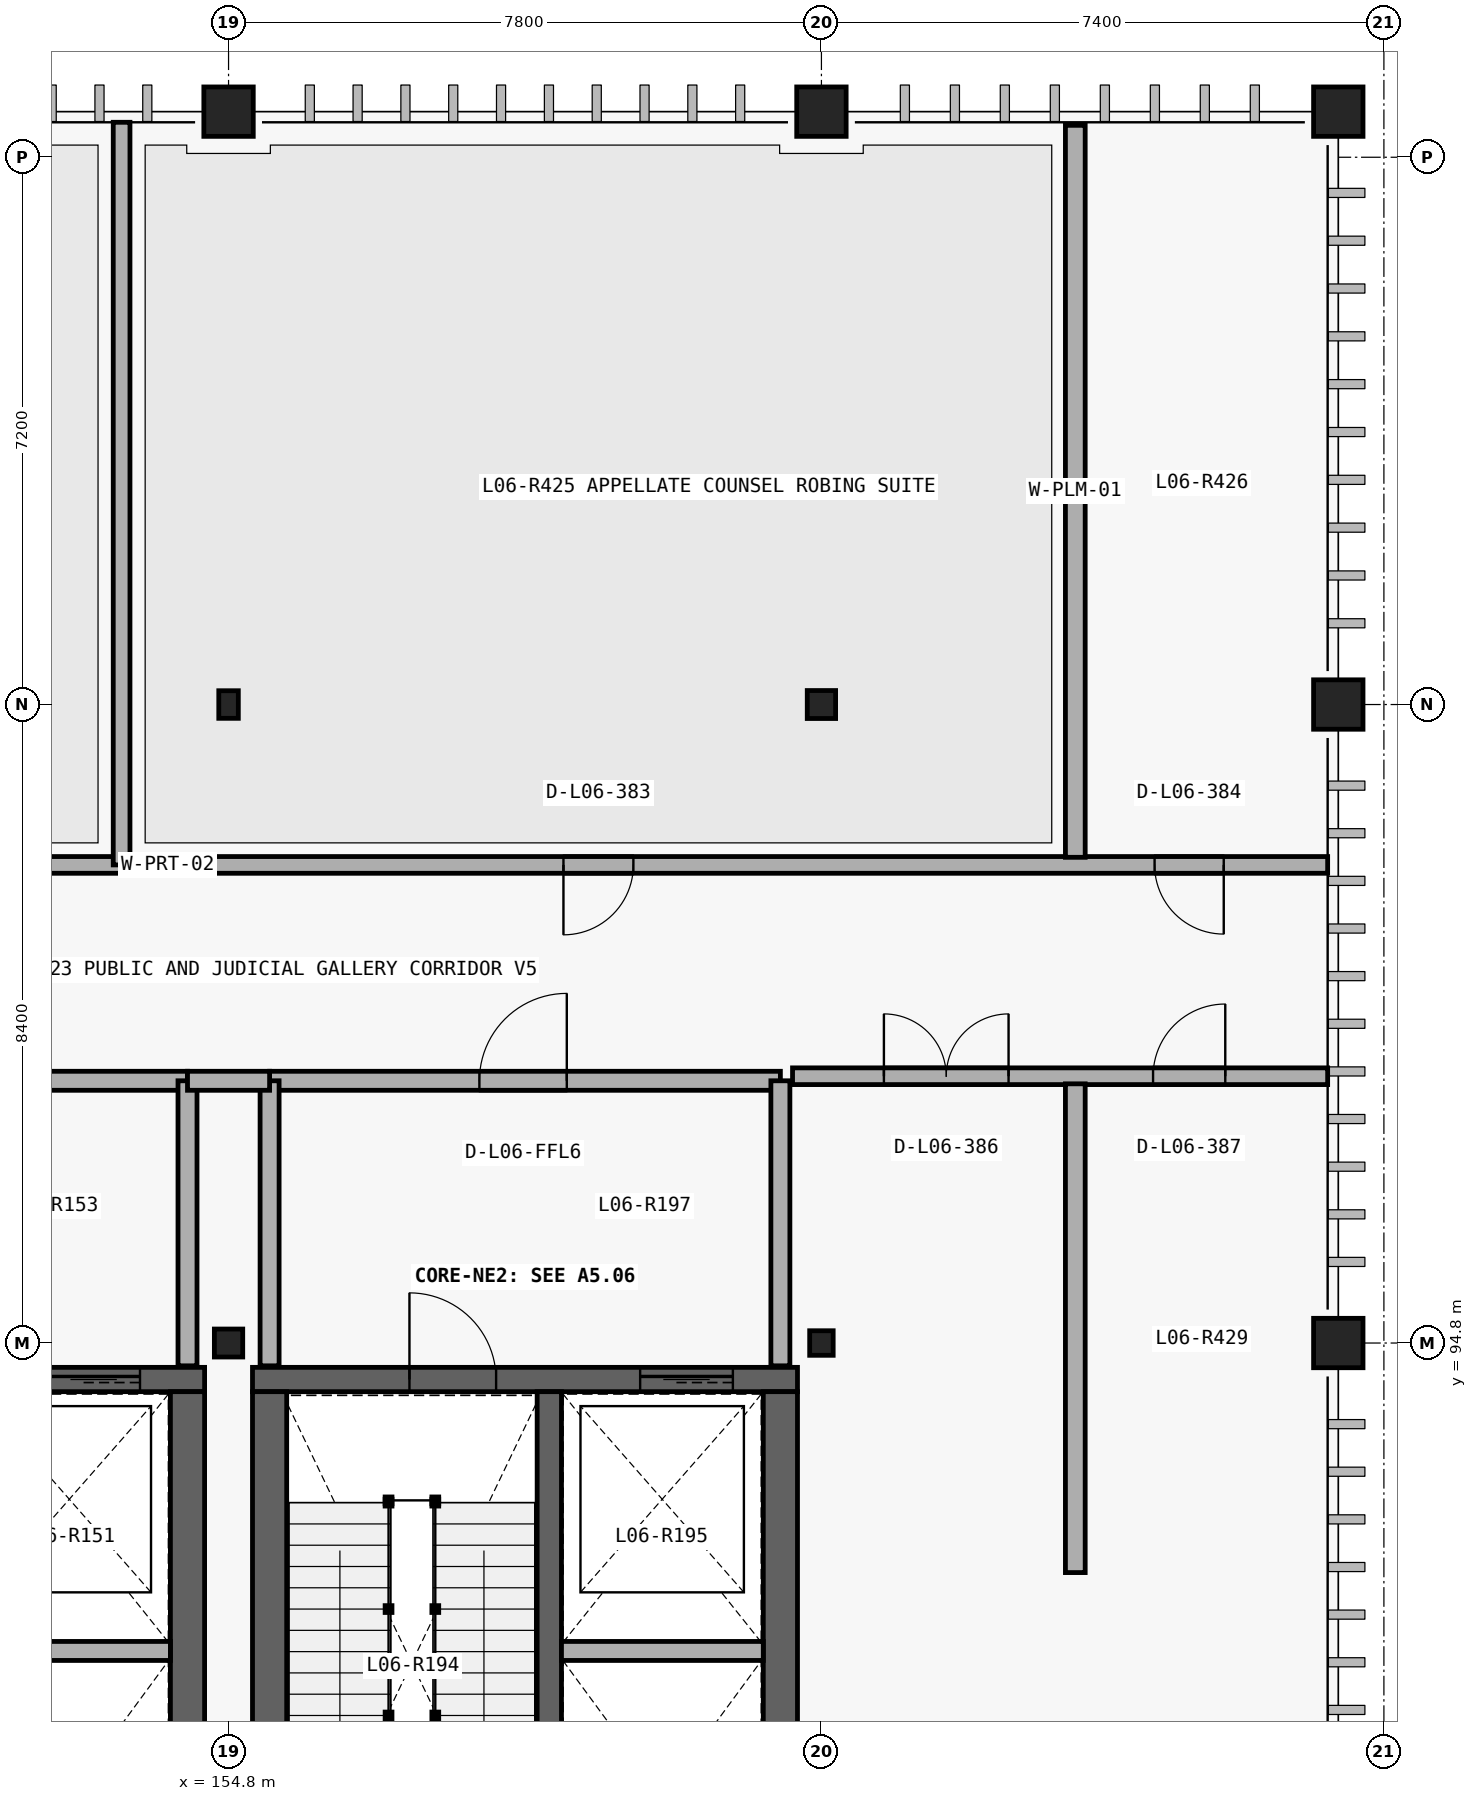
"""IFC4 building model, lengths in metres.
Left out: names, types, materials, properties, quantities, classifications, styles, units other than length and angle.
Written with IfcOpenShell. Run it as: python <this file> out.ifc"""

import sys

from ifc_helpers import new_model, si_unit, direction, frame, frame_2d, origin_with_axes, origin_2d_with_axis, place, context, subcontext, project, spatial, rectangle, circle, i_section, extrude, element, fill, save


model = new_model("IFC4")
c1 = context("Model", 3, precision=1e-05, world=origin_with_axes(), true_north=direction((0.0, 1.0)))
c2 = subcontext(c1, "Body", "Model", "MODEL_VIEW")
j1 = project(units=[si_unit("LENGTHUNIT", "METRE"), si_unit("PLANEANGLEUNIT", "RADIAN")], contexts=[c1])
p1 = place(None, origin_with_axes())
s1 = spatial("IfcSite", under=j1, at=p1, CompositionType="ELEMENT")
p2 = place(p1, origin_with_axes())
s2 = spatial("IfcBuilding", under=s1, at=p2, CompositionType="ELEMENT")
p3 = place(p2, frame((0.0, 0.0, 29.7), z_axis=(0.0, 0.0, 1.0), x_axis=(1.0, 0.0, 0.0)))
s3 = spatial("IfcBuildingStorey", under=s2, at=p3, CompositionType="ELEMENT", Elevation=29.7)
p4 = place(None, frame((154.485, 94.32, 29.7), z_axis=(0.0, 0.0, 1.0), x_axis=(-1.0, 0.0, 0.0)))
e1 = element("IfcWall", 1, at=p4, inside=s3, PredefinedType="SHEAR", context=c2, shape_type="SweptSolid", body=[
    extrude(rectangle(XDim=7.17, YDim=0.32, at=frame_2d((3.585, 0.0), x_axis=(1.0, 0.0))), origin_with_axes(), (0.0, 0.0, 1.0), 4.8),
])
p5 = place(None, frame((149.95, 94.32, 29.7), z_axis=(0.0, 0.0, 1.0), x_axis=(-1.0, 0.0, 0.0)))
e2 = element("IfcOpeningElement", 2, at=p5, cuts=e1, PredefinedType="OPENING", context=c2, shape_type="SweptSolid", body=[
    extrude(rectangle(XDim=1.14, YDim=2.18, at=frame_2d((0.0, 1.09), x_axis=(1.0, 0.0))), frame((0.0, 0.17, 0.0), z_axis=(0.0, -1.0, 0.0), x_axis=(1.0, 0.0, 0.0)), (0.0, 0.0, 1.0), 0.34),
])
p6 = place(None, frame((153.025, 94.32, 29.7), z_axis=(0.0, 0.0, 1.0), x_axis=(-1.0, 0.0, 0.0)))
e3 = element("IfcOpeningElement", 3, at=p6, cuts=e1, PredefinedType="OPENING", context=c2, shape_type="SweptSolid", body=[
    extrude(rectangle(XDim=1.22, YDim=2.28, at=frame_2d((0.0, 1.14), x_axis=(1.0, 0.0))), frame((0.0, 0.17, 0.0), z_axis=(0.0, -1.0, 0.0), x_axis=(1.0, 0.0, 0.0)), (0.0, 0.0, 1.0), 0.34),
])
p7 = place(None, frame((154.26, 87.04, 29.7), z_axis=(0.0, 0.0, 1.0), x_axis=(0.0, 1.0, 0.0)))
e4 = element("IfcWall", 4, at=p7, inside=s3, PredefinedType="SHEAR", context=c2, shape_type="SweptSolid", body=[
    extrude(rectangle(XDim=7.12, YDim=0.45, at=frame_2d((3.56, 0.0), x_axis=(1.0, 0.0))), origin_with_axes(), (0.0, 0.0, 1.0), 4.8),
])
p8 = place(None, frame((151.38, 90.749, 29.7), z_axis=(0.0, 0.0, 1.0), x_axis=(1.0, 0.0, 0.0)))
e5 = element("IfcWall", 5, at=p8, inside=s3, PredefinedType="PARTITIONING", context=c2, shape_type="SweptSolid", body=[
    extrude(rectangle(XDim=2.655, YDim=0.25, at=frame_2d((1.327, 0.0), x_axis=(1.0, 0.0))), origin_with_axes(), (0.0, 0.0, 1.0), 4.48),
])
p9 = place(None, frame((154.26, 98.25, 29.7), z_axis=(0.0, 0.0, 1.0), x_axis=(-1.0, 0.0, 0.0)))
e6 = element("IfcWall", 6, at=p9, inside=s3, PredefinedType="PARTITIONING", context=c2, shape_type="SweptSolid", body=[
    extrude(rectangle(XDim=6.72, YDim=0.25, at=frame_2d((3.36, 0.0), x_axis=(1.0, 0.0))), origin_with_axes(), (0.0, 0.0, 1.0), 4.48),
])
p10 = place(None, frame((150.875, 98.25, 29.7), z_axis=(0.0, 0.0, 1.0), x_axis=(-1.0, 0.0, 0.0)))
e7 = element("IfcOpeningElement", 7, at=p10, cuts=e6, PredefinedType="OPENING", context=c2, shape_type="SweptSolid", body=[
    extrude(rectangle(XDim=1.15, YDim=2.25, at=frame_2d((0.0, 1.125), x_axis=(1.0, 0.0))), frame((0.0, 0.135, 0.0), z_axis=(0.0, -1.0, 0.0), x_axis=(1.0, 0.0, 0.0)), (0.0, 0.0, 1.0), 0.27),
])
p11 = place(None, frame((154.26, 94.5, 29.7), z_axis=(0.0, 0.0, 1.0), x_axis=(0.0, 1.0, 0.0)))
e8 = element("IfcWall", 8, at=p11, inside=s3, PredefinedType="PARTITIONING", context=c2, shape_type="SweptSolid", body=[
    extrude(rectangle(XDim=3.75, YDim=0.25, at=frame_2d((1.875, 0.0), x_axis=(1.0, 0.0))), origin_with_axes(), (0.0, 0.0, 1.0), 4.48),
])
p12 = place(None, frame((162.285, 94.32, 29.7), z_axis=(0.0, 0.0, 1.0), x_axis=(-1.0, 0.0, 0.0)))
e9 = element("IfcWall", 9, at=p12, inside=s3, PredefinedType="SHEAR", context=c2, shape_type="SweptSolid", body=[
    extrude(rectangle(XDim=7.17, YDim=0.32, at=frame_2d((3.585, 0.0), x_axis=(1.0, 0.0))), origin_with_axes(), (0.0, 0.0, 1.0), 4.8),
])
p13 = place(None, frame((157.75, 94.32, 29.7), z_axis=(0.0, 0.0, 1.0), x_axis=(-1.0, 0.0, 0.0)))
e10 = element("IfcOpeningElement", 10, at=p13, cuts=e9, PredefinedType="OPENING", context=c2, shape_type="SweptSolid", body=[
    extrude(rectangle(XDim=1.14, YDim=2.18, at=frame_2d((0.0, 1.09), x_axis=(1.0, 0.0))), frame((0.0, 0.17, 0.0), z_axis=(0.0, -1.0, 0.0), x_axis=(1.0, 0.0, 0.0)), (0.0, 0.0, 1.0), 0.34),
])
p14 = place(None, frame((160.825, 94.32, 29.7), z_axis=(0.0, 0.0, 1.0), x_axis=(-1.0, 0.0, 0.0)))
e11 = element("IfcOpeningElement", 11, at=p14, cuts=e9, PredefinedType="OPENING", context=c2, shape_type="SweptSolid", body=[
    extrude(rectangle(XDim=1.22, YDim=2.28, at=frame_2d((0.0, 1.14), x_axis=(1.0, 0.0))), frame((0.0, 0.17, 0.0), z_axis=(0.0, -1.0, 0.0), x_axis=(1.0, 0.0, 0.0)), (0.0, 0.0, 1.0), 0.34),
])
for number, where, z_axis, x_axis in (
    (12, (162.06, 87.04, 29.7), (0.0, 0.0, 1.0), (0.0, 1.0, 0.0)),
    (13, (155.34, 94.16, 29.7), (0.0, 0.0, 1.0), (0.0, -1.0, 0.0)),
):
    element("IfcWall", number, at=place(None, frame(where, z_axis=z_axis, x_axis=x_axis)), inside=s3, PredefinedType="SHEAR", context=c2, shape_type="SweptSolid", body=[
        extrude(rectangle(XDim=7.12, YDim=0.45, at=frame_2d((3.56, 0.0), x_axis=(1.0, 0.0))), origin_with_axes(), (0.0, 0.0, 1.0), 4.8),
    ])
p15 = place(None, frame((159.02, 87.04, 29.7), z_axis=(0.0, 0.0, 1.0), x_axis=(0.0, 1.0, 0.0)))
e14 = element("IfcWall", 14, at=p15, inside=s3, PredefinedType="SHEAR", context=c2, shape_type="SweptSolid", body=[
    extrude(rectangle(XDim=7.12, YDim=0.32, at=frame_2d((3.56, 0.0), x_axis=(1.0, 0.0))), origin_with_axes(), (0.0, 0.0, 1.0), 4.8),
])
p16 = place(None, frame((159.18, 90.749, 29.7), z_axis=(0.0, 0.0, 1.0), x_axis=(1.0, 0.0, 0.0)))
e15 = element("IfcWall", 15, at=p16, inside=s3, PredefinedType="PARTITIONING", context=c2, shape_type="SweptSolid", body=[
    extrude(rectangle(XDim=2.655, YDim=0.25, at=frame_2d((1.327, 0.0), x_axis=(1.0, 0.0))), origin_with_axes(), (0.0, 0.0, 1.0), 4.48),
])
p17 = place(None, frame((162.06, 98.25, 29.7), z_axis=(0.0, 0.0, 1.0), x_axis=(-1.0, 0.0, 0.0)))
e16 = element("IfcWall", 16, at=p17, inside=s3, PredefinedType="PARTITIONING", context=c2, shape_type="SweptSolid", body=[
    extrude(rectangle(XDim=6.72, YDim=0.25, at=frame_2d((3.36, 0.0), x_axis=(1.0, 0.0))), origin_with_axes(), (0.0, 0.0, 1.0), 4.48),
])
p18 = place(None, frame((158.675, 98.25, 29.7), z_axis=(0.0, 0.0, 1.0), x_axis=(-1.0, 0.0, 0.0)))
e17 = element("IfcOpeningElement", 17, at=p18, cuts=e16, PredefinedType="OPENING", context=c2, shape_type="SweptSolid", body=[
    extrude(rectangle(XDim=1.15, YDim=2.25, at=frame_2d((0.0, 1.125), x_axis=(1.0, 0.0))), frame((0.0, 0.135, 0.0), z_axis=(0.0, -1.0, 0.0), x_axis=(1.0, 0.0, 0.0)), (0.0, 0.0, 1.0), 0.27),
])
for number, where, z_axis, x_axis in (
    (18, (155.34, 94.5, 29.7), (0.0, 0.0, 1.0), (0.0, 1.0, 0.0)),
    (19, (162.06, 94.5, 29.7), (0.0, 0.0, 1.0), (0.0, 1.0, 0.0)),
):
    element("IfcWall", number, at=place(None, frame(where, z_axis=z_axis, x_axis=x_axis)), inside=s3, PredefinedType="PARTITIONING", context=c2, shape_type="SweptSolid", body=[
        extrude(rectangle(XDim=3.75, YDim=0.25, at=frame_2d((1.875, 0.0), x_axis=(1.0, 0.0))), origin_with_axes(), (0.0, 0.0, 1.0), 4.48),
    ])
p19 = place(None, frame((154.26, 98.25, 29.7), z_axis=(0.0, 0.0, 1.0), x_axis=(1.0, 0.0, 0.0)))
e20 = element("IfcWall", 20, at=p19, inside=s3, PredefinedType="PARTITIONING", context=c2, shape_type="SweptSolid", body=[
    extrude(rectangle(XDim=1.08, YDim=0.25, at=frame_2d((0.54, 0.0), x_axis=(1.0, 0.0))), origin_with_axes(), (0.0, 0.0, 1.0), 4.48),
])
p20 = place(None, frame((138.74, 101.09, 29.7), z_axis=(0.0, 0.0, 1.0), x_axis=(1.0, 0.0, 0.0)))
e21 = element("IfcWall", 21, at=p20, inside=s3, PredefinedType="PARTITIONING", context=c2, shape_type="SweptSolid", body=[
    extrude(rectangle(XDim=30.52, YDim=0.22, at=frame_2d((15.26, 0.0), x_axis=(1.0, 0.0))), origin_with_axes(), (0.0, 0.0, 1.0), 4.48),
])
p21 = place(None, frame((146.228, 101.09, 29.7), z_axis=(0.0, 0.0, 1.0), x_axis=(1.0, 0.0, 0.0)))
e22 = element("IfcOpeningElement", 22, at=p21, cuts=e21, PredefinedType="OPENING", context=c2, shape_type="SweptSolid", body=[
    extrude(rectangle(XDim=1.88, YDim=2.56, at=frame_2d((0.0, 1.28), x_axis=(1.0, 0.0))), frame((0.0, 0.12, 0.0), z_axis=(0.0, -1.0, 0.0), x_axis=(1.0, 0.0, 0.0)), (0.0, 0.0, 1.0), 0.24),
])
p22 = place(None, frame((159.666, 101.09, 29.7), z_axis=(0.0, 0.0, 1.0), x_axis=(1.0, 0.0, 0.0)))
e23 = element("IfcOpeningElement", 23, at=p22, cuts=e21, PredefinedType="OPENING", context=c2, shape_type="SweptSolid", body=[
    extrude(rectangle(XDim=0.92, YDim=2.14, at=frame_2d((0.0, 1.07), x_axis=(1.0, 0.0))), frame((0.0, 0.12, 0.0), z_axis=(0.0, -1.0, 0.0), x_axis=(1.0, 0.0, 0.0)), (0.0, 0.0, 1.0), 0.24),
])
p23 = place(None, frame((167.438, 101.09, 29.7), z_axis=(0.0, 0.0, 1.0), x_axis=(1.0, 0.0, 0.0)))
e24 = element("IfcOpeningElement", 24, at=p23, cuts=e21, PredefinedType="OPENING", context=c2, shape_type="SweptSolid", body=[
    extrude(rectangle(XDim=0.91, YDim=2.12, at=frame_2d((0.0, 1.06), x_axis=(1.0, 0.0))), frame((0.0, 0.12, 0.0), z_axis=(0.0, -1.0, 0.0), x_axis=(1.0, 0.0, 0.0)), (0.0, 0.0, 1.0), 0.24),
])
p24 = place(None, frame((162.22, 98.31, 29.7), z_axis=(0.0, 0.0, 1.0), x_axis=(1.0, 0.0, 0.0)))
e25 = element("IfcWall", 25, at=p24, inside=s3, PredefinedType="PARTITIONING", context=c2, shape_type="SweptSolid", body=[
    extrude(rectangle(XDim=7.04, YDim=0.22, at=frame_2d((3.52, 0.0), x_axis=(1.0, 0.0))), origin_with_axes(), (0.0, 0.0, 1.0), 4.48),
])
p25 = place(None, frame((164.242, 98.31, 29.7), z_axis=(0.0, 0.0, 1.0), x_axis=(1.0, 0.0, 0.0)))
e26 = element("IfcOpeningElement", 26, at=p25, cuts=e25, PredefinedType="OPENING", context=c2, shape_type="SweptSolid", body=[
    extrude(rectangle(XDim=1.64, YDim=2.42, at=frame_2d((0.0, 1.21), x_axis=(1.0, 0.0))), frame((0.0, 0.12, 0.0), z_axis=(0.0, -1.0, 0.0), x_axis=(1.0, 0.0, 0.0)), (0.0, 0.0, 1.0), 0.24),
])
p26 = place(None, frame((167.438, 98.31, 29.7), z_axis=(0.0, 0.0, 1.0), x_axis=(1.0, 0.0, 0.0)))
e27 = element("IfcOpeningElement", 27, at=p26, cuts=e25, PredefinedType="OPENING", context=c2, shape_type="SweptSolid", body=[
    extrude(rectangle(XDim=0.95, YDim=2.1, at=frame_2d((0.0, 1.05), x_axis=(1.0, 0.0))), frame((0.0, 0.12, 0.0), z_axis=(0.0, -1.0, 0.0), x_axis=(1.0, 0.0, 0.0)), (0.0, 0.0, 1.0), 0.24),
])
p27 = place(None, frame((165.94, 101.19, 29.7), z_axis=(0.0, 0.0, 1.0), x_axis=(0.0, 1.0, 0.0)))
e28 = element("IfcWall", 28, at=p27, inside=s3, PredefinedType="PLUMBINGWALL", context=c2, shape_type="SweptSolid", body=[
    extrude(rectangle(XDim=9.63, YDim=0.26, at=frame_2d((4.815, 0.0), x_axis=(1.0, 0.0))), origin_with_axes(), (0.0, 0.0, 1.0), 4.48),
])
p28 = place(None, frame((165.94, 91.78, 29.7), z_axis=(0.0, 0.0, 1.0), x_axis=(0.0, 1.0, 0.0)))
e29 = element("IfcWall", 29, at=p28, inside=s3, PredefinedType="PLUMBINGWALL", context=c2, shape_type="SweptSolid", body=[
    extrude(rectangle(XDim=6.43, YDim=0.26, at=frame_2d((3.215, 0.0), x_axis=(1.0, 0.0))), origin_with_axes(), (0.0, 0.0, 1.0), 4.48),
])
p29 = place(None, frame((153.393, 101.09, 29.7), z_axis=(0.0, 0.0, 1.0), x_axis=(0.0, 1.0, 0.0)))
e30 = element("IfcWall", 30, at=p29, inside=s3, PredefinedType="PARTITIONING", context=c2, shape_type="SweptSolid", body=[
    extrude(rectangle(XDim=9.77, YDim=0.22, at=frame_2d((4.885, 0.0), x_axis=(1.0, 0.0))), origin_with_axes(), (0.0, 0.0, 1.0), 4.48),
])
p30 = place(None, frame((154.8, 94.8, 29.7), z_axis=(0.0, 0.0, 1.0), x_axis=(1.0, 0.0, 0.0)))
e31 = element("IfcColumn", 31, at=p30, inside=s3, PredefinedType="COLUMN", context=c2, shape_type="SweptSolid", body=[
    extrude(i_section(OverallWidth=0.373, OverallDepth=0.368, WebThickness=0.015, FlangeThickness=0.024, at=origin_2d_with_axis()), origin_with_axes(), (0.0, 0.0, 1.0), 4.8),
])
p31 = place(None, frame((154.8, 103.2, 29.7), z_axis=(0.0, 0.0, 1.0), x_axis=(1.0, 0.0, 0.0)))
e32 = element("IfcColumn", 32, at=p31, inside=s3, PredefinedType="COLUMN", context=c2, shape_type="SweptSolid", body=[
    extrude(i_section(OverallWidth=0.257, OverallDepth=0.363, WebThickness=0.013, FlangeThickness=0.022, at=origin_2d_with_axis()), origin_with_axes(), (0.0, 0.0, 1.0), 4.8),
])
p32 = place(None, frame((154.8, 111.0, 29.7), z_axis=(0.0, 0.0, 1.0), x_axis=(1.0, 0.0, 0.0)))
e33 = element("IfcColumn", 33, at=p32, inside=s3, PredefinedType="COLUMN", context=c2, shape_type="SweptSolid", body=[
    extrude(circle(Radius=0.325, at=origin_2d_with_axis()), origin_with_axes(), (0.0, 0.0, 1.0), 4.8),
])
p33 = place(None, frame((162.6, 94.8, 29.7), z_axis=(0.0, 0.0, 1.0), x_axis=(1.0, 0.0, 0.0)))
e34 = element("IfcColumn", 34, at=p33, inside=s3, PredefinedType="COLUMN", context=c2, shape_type="SweptSolid", body=[
    extrude(i_section(OverallWidth=0.309, OverallDepth=0.323, WebThickness=0.014, FlangeThickness=0.023, at=origin_2d_with_axis()), origin_with_axes(), (0.0, 0.0, 1.0), 4.8),
])
p34 = place(None, frame((162.6, 103.2, 29.7), z_axis=(0.0, 0.0, 1.0), x_axis=(1.0, 0.0, 0.0)))
e35 = element("IfcColumn", 35, at=p34, inside=s3, PredefinedType="COLUMN", context=c2, shape_type="SweptSolid", body=[
    extrude(i_section(OverallWidth=0.373, OverallDepth=0.368, WebThickness=0.015, FlangeThickness=0.024, at=origin_2d_with_axis()), origin_with_axes(), (0.0, 0.0, 1.0), 4.8),
])
for number, where, z_axis, x_axis in (
    (36, (162.6, 111.0, 29.7), (0.0, 0.0, 1.0), (1.0, 0.0, 0.0)),
    (37, (169.4, 94.8, 29.7), (0.0, 0.0, 1.0), (1.0, 0.0, 0.0)),
    (38, (169.4, 103.2, 29.7), (0.0, 0.0, 1.0), (1.0, 0.0, 0.0)),
    (39, (169.4, 111.0, 29.7), (0.0, 0.0, 1.0), (1.0, 0.0, 0.0)),
):
    element("IfcColumn", number, at=place(None, frame(where, z_axis=z_axis, x_axis=x_axis)), inside=s3, PredefinedType="COLUMN", context=c2, shape_type="SweptSolid", body=[
        extrude(circle(Radius=0.325, at=origin_2d_with_axis()), origin_with_axes(), (0.0, 0.0, 1.0), 4.8),
    ])
p35 = place(None, frame((153.025, 94.32, 29.7), z_axis=(0.0, 0.0, 1.0), x_axis=(1.0, 0.0, 0.0)))
e40 = element("IfcDoor", 40, at=p35, inside=s3, OperationType="SLIDING_TO_LEFT", PredefinedType="DOOR", context=c2, shape_type="SweptSolid", body=[
    extrude(rectangle(XDim=1.22, YDim=2.28, at=frame_2d((0.0, 1.14), x_axis=(1.0, 0.0))), frame((0.0, 0.04, 0.0), z_axis=(0.0, -1.0, 0.0), x_axis=(1.0, 0.0, 0.0)), (0.0, 0.0, 1.0), 0.08),
])
fill(e3, e40)
p36 = place(None, frame((157.75, 94.32, 29.7), z_axis=(0.0, 0.0, 1.0), x_axis=(1.0, 0.0, 0.0)))
e41 = element("IfcDoor", 41, at=p36, inside=s3, OperationType="SINGLE_SWING_RIGHT", PredefinedType="DOOR", context=c2, shape_type="SweptSolid", body=[
    extrude(rectangle(XDim=1.14, YDim=2.18, at=frame_2d((0.0, 1.09), x_axis=(1.0, 0.0))), frame((0.0, 0.04, 0.0), z_axis=(0.0, -1.0, 0.0), x_axis=(1.0, 0.0, 0.0)), (0.0, 0.0, 1.0), 0.08),
])
fill(e10, e41)
p37 = place(None, frame((160.825, 94.32, 29.7), z_axis=(0.0, 0.0, 1.0), x_axis=(1.0, 0.0, 0.0)))
e42 = element("IfcDoor", 42, at=p37, inside=s3, OperationType="SLIDING_TO_LEFT", PredefinedType="DOOR", context=c2, shape_type="SweptSolid", body=[
    extrude(rectangle(XDim=1.22, YDim=2.28, at=frame_2d((0.0, 1.14), x_axis=(1.0, 0.0))), frame((0.0, 0.04, 0.0), z_axis=(0.0, -1.0, 0.0), x_axis=(1.0, 0.0, 0.0)), (0.0, 0.0, 1.0), 0.08),
])
fill(e11, e42)
p38 = place(None, frame((158.675, 98.25, 29.7), z_axis=(0.0, 0.0, 1.0), x_axis=(1.0, 0.0, 0.0)))
e43 = element("IfcDoor", 43, at=p38, inside=s3, OperationType="SINGLE_SWING_LEFT", PredefinedType="DOOR", context=c2, shape_type="SweptSolid", body=[
    extrude(rectangle(XDim=1.15, YDim=2.25, at=frame_2d((0.0, 1.125), x_axis=(1.0, 0.0))), frame((0.0, 0.04, 0.0), z_axis=(0.0, -1.0, 0.0), x_axis=(1.0, 0.0, 0.0)), (0.0, 0.0, 1.0), 0.08),
])
fill(e17, e43)
p39 = place(None, frame((159.666, 101.09, 29.7), z_axis=(0.0, 0.0, 1.0), x_axis=(-1.0, 0.0, 0.0)))
e44 = element("IfcDoor", 44, at=p39, inside=s3, OperationType="SINGLE_SWING_LEFT", PredefinedType="DOOR", context=c2, shape_type="SweptSolid", body=[
    extrude(rectangle(XDim=0.92, YDim=2.14, at=frame_2d((0.0, 1.07), x_axis=(1.0, 0.0))), frame((0.0, 0.04, 0.0), z_axis=(0.0, -1.0, 0.0), x_axis=(1.0, 0.0, 0.0)), (0.0, 0.0, 1.0), 0.08),
])
fill(e23, e44)
p40 = place(None, frame((167.438, 101.09, 29.7), z_axis=(0.0, 0.0, 1.0), x_axis=(-1.0, 0.0, 0.0)))
e45 = element("IfcDoor", 45, at=p40, inside=s3, OperationType="SINGLE_SWING_RIGHT", PredefinedType="DOOR", context=c2, shape_type="SweptSolid", body=[
    extrude(rectangle(XDim=0.91, YDim=2.12, at=frame_2d((0.0, 1.06), x_axis=(1.0, 0.0))), frame((0.0, 0.04, 0.0), z_axis=(0.0, -1.0, 0.0), x_axis=(1.0, 0.0, 0.0)), (0.0, 0.0, 1.0), 0.08),
])
fill(e24, e45)
p41 = place(None, frame((164.242, 98.31, 29.7), z_axis=(0.0, 0.0, 1.0), x_axis=(1.0, 0.0, 0.0)))
e46 = element("IfcDoor", 46, at=p41, inside=s3, OperationType="DOUBLE_DOOR_SINGLE_SWING", PredefinedType="DOOR", context=c2, shape_type="SweptSolid", body=[
    extrude(rectangle(XDim=1.64, YDim=2.42, at=frame_2d((0.0, 1.21), x_axis=(1.0, 0.0))), frame((0.0, 0.04, 0.0), z_axis=(0.0, -1.0, 0.0), x_axis=(1.0, 0.0, 0.0)), (0.0, 0.0, 1.0), 0.08),
])
fill(e26, e46)
p42 = place(None, frame((167.438, 98.31, 29.7), z_axis=(0.0, 0.0, 1.0), x_axis=(1.0, 0.0, 0.0)))
e47 = element("IfcDoor", 47, at=p42, inside=s3, OperationType="SINGLE_SWING_RIGHT", PredefinedType="DOOR", context=c2, shape_type="SweptSolid", body=[
    extrude(rectangle(XDim=0.95, YDim=2.1, at=frame_2d((0.0, 1.05), x_axis=(1.0, 0.0))), frame((0.0, 0.04, 0.0), z_axis=(0.0, -1.0, 0.0), x_axis=(1.0, 0.0, 0.0)), (0.0, 0.0, 1.0), 0.08),
])
fill(e27, e47)
save(model, sys.argv[1])
